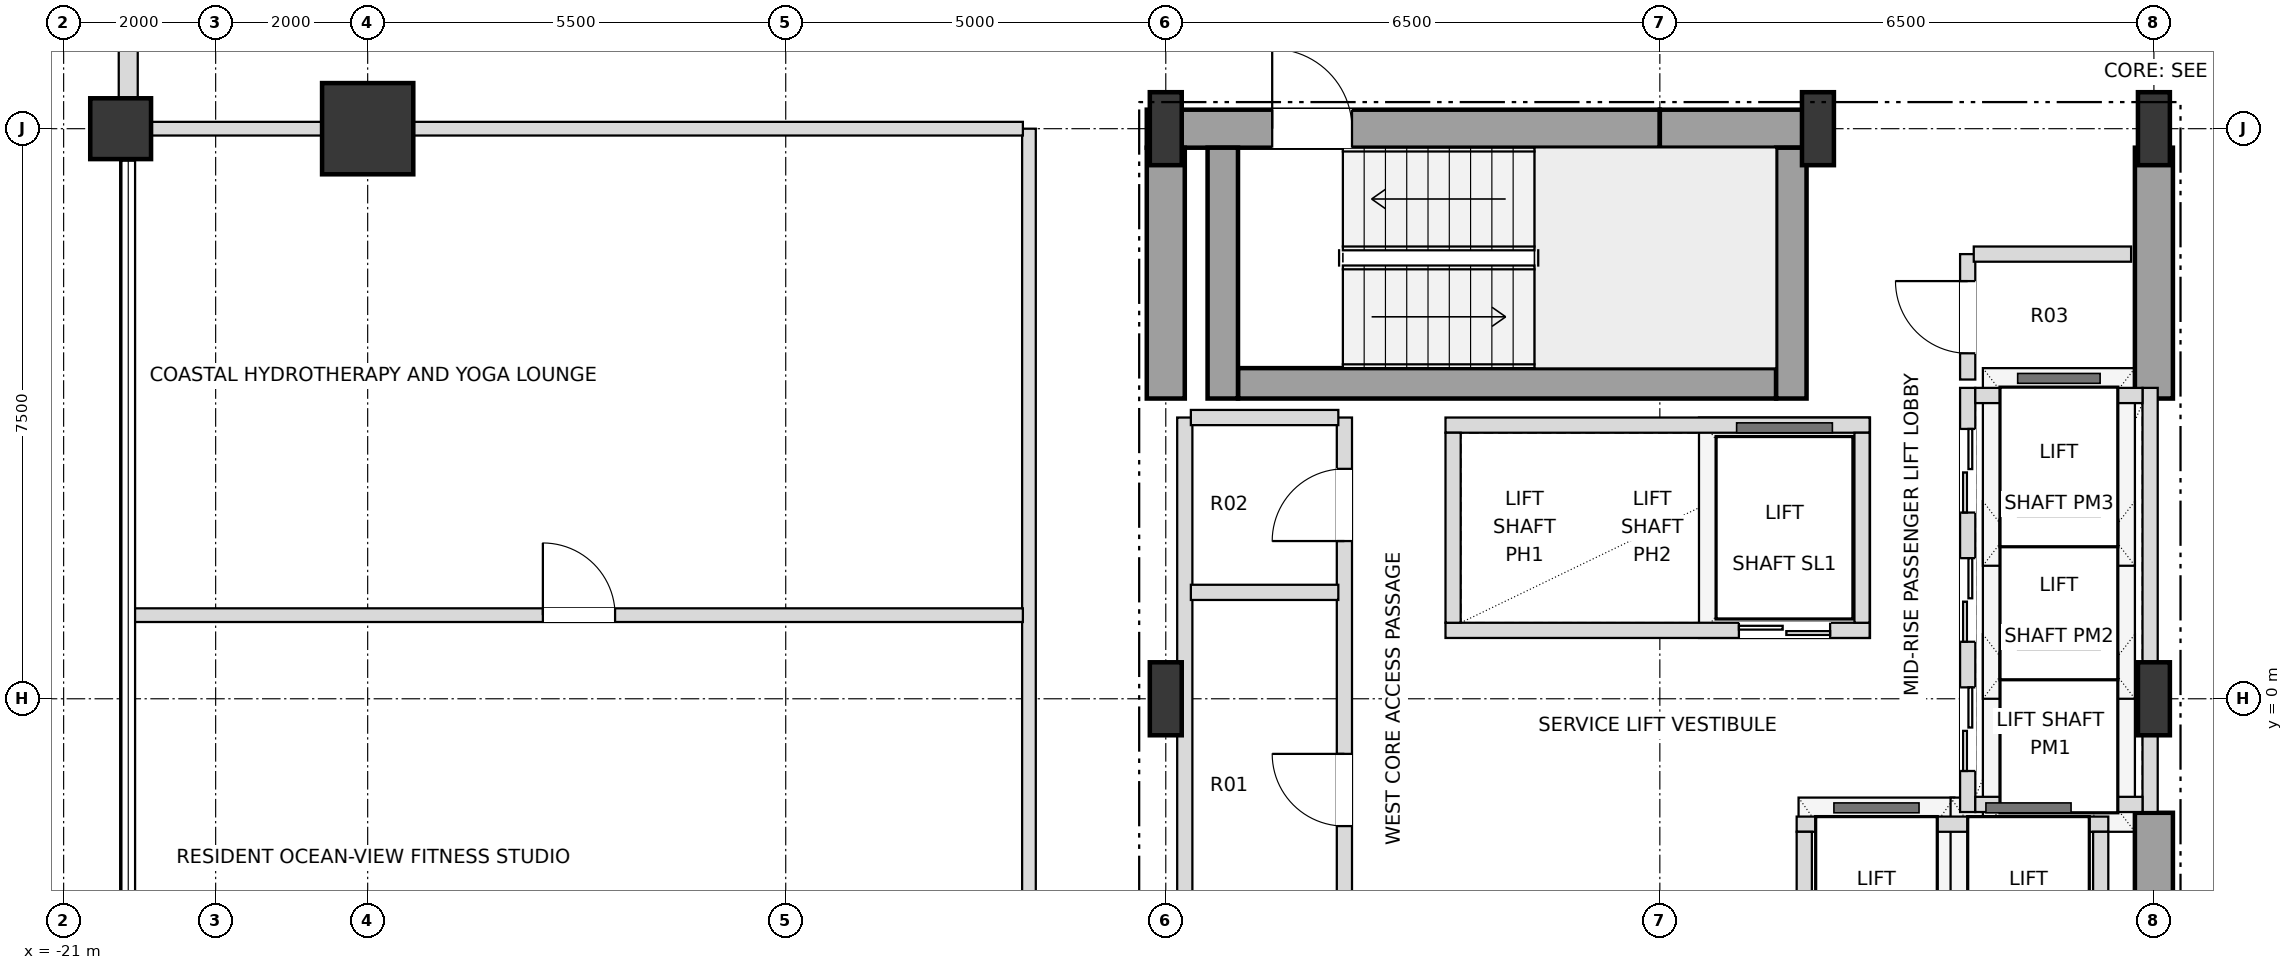
"""IFC4 building model, lengths in metres.
Left out: names, types, materials, properties, quantities, classifications, styles, units other than length and angle.
Written with IfcOpenShell. Run it as: python <this file> out.ifc"""

import sys

from ifc_helpers import new_model, si_unit, direction, frame, frame_2d, origin, origin_2d, place, context, subcontext, project, spatial, rectangle, i_section, extrude, element, fill, save


model = new_model("IFC4")
c1 = context("Model", 3, precision=1e-05, world=origin(), true_north=direction((0.0, 1.0)))
c2 = subcontext(c1, "Body", "Model", "MODEL_VIEW")
j1 = project(units=[si_unit("LENGTHUNIT", "METRE"), si_unit("PLANEANGLEUNIT", "RADIAN")], contexts=[c1])
p1 = place(None, origin())
s1 = spatial("IfcSite", under=j1, at=p1, CompositionType="ELEMENT")
p2 = place(p1, origin())
s2 = spatial("IfcBuilding", under=s1, at=p2, CompositionType="ELEMENT")
p3 = place(p2, frame((0.0, 0.0, 158.4)))
s3 = spatial("IfcBuildingStorey", under=s2, at=p3, CompositionType="ELEMENT", Elevation=158.4)
for number, where, z_axis, x_axis in (
    (1, (-6.5, 0.0, 0.0), (0.0, 0.0, 1.0), (1.0, 0.0, 0.0)),
    (2, (6.5, 0.0, 0.0), (0.0, 0.0, 1.0), (1.0, 0.0, 0.0)),
    (3, (-6.5, 7.5, 0.0), (0.0, 0.0, 1.0), (1.0, 0.0, 0.0)),
    (4, (2.08, 7.5, 0.0), (0.0, 0.0, 1.0), (1.0, 0.0, 0.0)),
    (5, (6.5, 7.5, 0.0), (0.0, 0.0, 1.0), (1.0, 0.0, 0.0)),
):
    element("IfcColumn", number, at=place(p3, frame(where, z_axis=z_axis, x_axis=x_axis)), inside=s3, PredefinedType="COLUMN", context=c2, shape_type="SweptSolid", body=[
        extrude(i_section(OverallWidth=0.42, OverallDepth=0.96, WebThickness=0.022, FlangeThickness=0.034, at=origin_2d()), origin(), (0.0, 0.0, 1.0), 3.6),
    ])
p4 = place(p3, frame((-17.0, 7.5, 0.0), z_axis=(0.0, 0.0, 1.0), x_axis=(1.0, 0.0, 0.0)))
e6 = element("IfcColumn", 6, at=p4, inside=s3, PredefinedType="USERDEFINED", context=c2, shape_type="SweptSolid", body=[
    extrude(rectangle(XDim=1.2, YDim=1.2, at=origin_2d()), origin(), (0.0, 0.0, 1.0), 3.6),
])
p5 = place(p3, frame((-20.25, 7.5, 0.0), z_axis=(0.0, 0.0, 1.0), x_axis=(1.0, 0.0, 0.0)))
e7 = element("IfcColumn", 7, at=p5, inside=s3, PredefinedType="COLUMN", context=c2, shape_type="SweptSolid", body=[
    extrude(rectangle(XDim=0.8, YDim=0.8, at=origin_2d()), origin(), (0.0, 0.0, 1.0), 3.6),
])
p6 = place(p3, frame((-20.15, 12.605, 0.0), z_axis=(0.0, 0.0, 1.0), x_axis=(0.0, -1.0, 0.0)))
e8 = element("IfcWall", 8, at=p6, inside=s3, PredefinedType="SOLIDWALL", context=c2, shape_type="SweptSolid", body=[
    extrude(rectangle(XDim=4.71, YDim=0.25, at=frame_2d((2.355, 0.0))), origin(), (0.0, 0.0, 1.0), 2.736),
])
p7 = place(p6, frame((1.455, 0.0, 0.72)))
e9 = element("IfcOpeningElement", 9, at=p7, cuts=e8, PredefinedType="OPENING", context=c2, shape_type="SweptSolid", body=[
    extrude(rectangle(XDim=1.8, YDim=1.68, at=frame_2d((0.9, 0.84))), frame((0.0, 0.135, 0.0), z_axis=(0.0, -1.0, 0.0), x_axis=(1.0, 0.0, 0.0)), (0.0, 0.0, 1.0), 0.27),
])
p8 = place(p3, frame((-6.75, 7.5, 0.0), z_axis=(0.0, 0.0, 1.0), x_axis=(1.0, 0.0, 0.0)))
e10 = element("IfcWall", 10, at=p8, inside=s3, PredefinedType="SHEAR", context=c2, shape_type="SweptSolid", body=[
    extrude(rectangle(XDim=6.75, YDim=0.5, at=frame_2d((3.375, 0.0))), origin(), (0.0, 0.0, 1.0), 3.38),
])
p9 = place(p8, frame((1.65, 0.0, 0.0)))
e11 = element("IfcOpeningElement", 11, at=p9, cuts=e10, PredefinedType="OPENING", context=c2, shape_type="SweptSolid", body=[
    extrude(rectangle(XDim=1.05, YDim=2.15, at=frame_2d((0.525, 1.075))), frame((0.0, 0.26, 0.0), z_axis=(0.0, -1.0, 0.0), x_axis=(1.0, 0.0, 0.0)), (0.0, 0.0, 1.0), 0.52),
])
p10 = place(p3, frame((0.0, 7.5, 0.0), z_axis=(0.0, 0.0, 1.0), x_axis=(1.0, 0.0, 0.0)))
e12 = element("IfcWall", 12, at=p10, inside=s3, PredefinedType="SHEAR", context=c2, shape_type="SweptSolid", body=[
    extrude(rectangle(XDim=2.08, YDim=0.5, at=frame_2d((1.04, 0.0))), origin(), (0.0, 0.0, 1.0), 3.38),
])
p11 = place(p3, frame((-6.5, 3.95, 0.0), z_axis=(0.0, 0.0, 1.0), x_axis=(0.0, 1.0, 0.0)))
e13 = element("IfcWall", 13, at=p11, inside=s3, PredefinedType="SHEAR", context=c2, shape_type="SweptSolid", body=[
    extrude(rectangle(XDim=3.3, YDim=0.5, at=frame_2d((1.65, 0.0))), origin(), (0.0, 0.0, 1.0), 3.38),
])
p12 = place(p3, frame((6.5, -7.25, 0.0), z_axis=(0.0, 0.0, 1.0), x_axis=(0.0, 1.0, 0.0)))
e14 = element("IfcWall", 14, at=p12, inside=s3, PredefinedType="SHEAR", context=c2, shape_type="SweptSolid", body=[
    extrude(rectangle(XDim=5.75, YDim=0.5, at=frame_2d((2.875, 0.0))), origin(), (0.0, 0.0, 1.0), 3.38),
])
p13 = place(p12, frame((0.85, 0.0, 0.0)))
e15 = element("IfcOpeningElement", 15, at=p13, cuts=e14, PredefinedType="OPENING", context=c2, shape_type="SweptSolid", body=[
    extrude(rectangle(XDim=1.05, YDim=2.15, at=frame_2d((0.525, 1.075))), frame((0.0, 0.26, 0.0), z_axis=(0.0, -1.0, 0.0), x_axis=(1.0, 0.0, 0.0)), (0.0, 0.0, 1.0), 0.52),
])
p14 = place(p3, frame((6.5, 3.95, 0.0), z_axis=(0.0, 0.0, 1.0), x_axis=(0.0, 1.0, 0.0)))
e16 = element("IfcWall", 16, at=p14, inside=s3, PredefinedType="SHEAR", context=c2, shape_type="SweptSolid", body=[
    extrude(rectangle(XDim=3.3, YDim=0.5, at=frame_2d((1.65, 0.0))), origin(), (0.0, 0.0, 1.0), 3.38),
])
p15 = place(p3, frame((-5.55, 4.15, 0.0), z_axis=(0.0, 0.0, 1.0), x_axis=(1.0, 0.0, 0.0)))
e17 = element("IfcWall", 17, at=p15, inside=s3, PredefinedType="SHEAR", context=c2, shape_type="SweptSolid", body=[
    extrude(rectangle(XDim=7.08, YDim=0.4, at=frame_2d((3.54, 0.0))), origin(), (0.0, 0.0, 1.0), 3.38),
])
for number, where, z_axis, x_axis in (
    (18, (1.73, 3.95, 0.0), (0.0, 0.0, 1.0), (0.0, 1.0, 0.0)),
    (19, (-5.75, 3.95, 0.0), (0.0, 0.0, 1.0), (0.0, 1.0, 0.0)),
):
    element("IfcWall", number, at=place(p3, frame(where, z_axis=z_axis, x_axis=x_axis)), inside=s3, PredefinedType="SHEAR", context=c2, shape_type="SweptSolid", body=[
        extrude(rectangle(XDim=3.3, YDim=0.4, at=frame_2d((1.65, 0.0))), origin(), (0.0, 0.0, 1.0), 3.38),
    ])
p16 = place(p3, frame((4.05, -1.49, 0.0), z_axis=(0.0, 0.0, 1.0), x_axis=(0.0, 1.0, 0.0)))
e20 = element("IfcWall", 20, at=p16, inside=s3, PredefinedType="SOLIDWALL", context=c2, shape_type="SweptSolid", body=[
    extrude(rectangle(XDim=5.58, YDim=0.2, at=frame_2d((2.79, 0.0))), origin(), (0.0, 0.0, 1.0), 3.38),
])
p17 = place(p16, frame((0.54, 0.0, 0.0)))
e21 = element("IfcOpeningElement", 21, at=p17, cuts=e20, PredefinedType="OPENING", context=c2, shape_type="SweptSolid", body=[
    extrude(rectangle(XDim=1.1, YDim=2.15, at=frame_2d((0.55, 1.075))), frame((0.0, 0.11, 0.0), z_axis=(0.0, -1.0, 0.0), x_axis=(1.0, 0.0, 0.0)), (0.0, 0.0, 1.0), 0.22),
])
p18 = place(p16, frame((2.24, 0.0, 0.0)))
e22 = element("IfcOpeningElement", 22, at=p18, cuts=e20, PredefinedType="OPENING", context=c2, shape_type="SweptSolid", body=[
    extrude(rectangle(XDim=1.1, YDim=2.15, at=frame_2d((0.55, 1.075))), frame((0.0, 0.11, 0.0), z_axis=(0.0, -1.0, 0.0), x_axis=(1.0, 0.0, 0.0)), (0.0, 0.0, 1.0), 0.22),
])
p19 = place(p16, frame((3.94, 0.0, 0.0)))
e23 = element("IfcOpeningElement", 23, at=p19, cuts=e20, PredefinedType="OPENING", context=c2, shape_type="SweptSolid", body=[
    extrude(rectangle(XDim=1.1, YDim=2.15, at=frame_2d((0.55, 1.075))), frame((0.0, 0.11, 0.0), z_axis=(0.0, -1.0, 0.0), x_axis=(1.0, 0.0, 0.0)), (0.0, 0.0, 1.0), 0.22),
])
p20 = place(p3, frame((6.45, -1.49, 0.0), z_axis=(0.0, 0.0, 1.0), x_axis=(0.0, 1.0, 0.0)))
e24 = element("IfcWall", 24, at=p20, inside=s3, PredefinedType="SOLIDWALL", context=c2, shape_type="SweptSolid", body=[
    extrude(rectangle(XDim=5.58, YDim=0.2, at=frame_2d((2.79, 0.0))), origin(), (0.0, 0.0, 1.0), 2.816),
])
for number, where, z_axis, x_axis in (
    (25, (4.15, -1.39, 0.0), (0.0, 0.0, 1.0), (1.0, 0.0, 0.0)),
    (26, (4.15, 3.99, 0.0), (0.0, 0.0, 1.0), (1.0, 0.0, 0.0)),
):
    element("IfcWall", number, at=place(p3, frame(where, z_axis=z_axis, x_axis=x_axis)), inside=s3, PredefinedType="SOLIDWALL", context=c2, shape_type="SweptSolid", body=[
        extrude(rectangle(XDim=2.2, YDim=0.2, at=frame_2d((1.1, 0.0))), origin(), (0.0, 0.0, 1.0), 3.38),
    ])
p21 = place(p3, frame((-2.82, 0.9, 0.0), z_axis=(0.0, 0.0, 1.0), x_axis=(1.0, 0.0, 0.0)))
e27 = element("IfcWall", 27, at=p21, inside=s3, PredefinedType="SOLIDWALL", context=c2, shape_type="SweptSolid", body=[
    extrude(rectangle(XDim=5.58, YDim=0.2, at=frame_2d((2.79, 0.0))), origin(), (0.0, 0.0, 1.0), 3.38),
])
p22 = place(p21, frame((3.86, 0.0, 0.0)))
e28 = element("IfcOpeningElement", 28, at=p22, cuts=e27, PredefinedType="OPENING", context=c2, shape_type="SweptSolid", body=[
    extrude(rectangle(XDim=1.2, YDim=2.2, at=frame_2d((0.6, 1.1))), frame((0.0, 0.11, 0.0), z_axis=(0.0, -1.0, 0.0), x_axis=(1.0, 0.0, 0.0)), (0.0, 0.0, 1.0), 0.22),
])
p23 = place(p3, frame((-2.82, 3.6, 0.0), z_axis=(0.0, 0.0, 1.0), x_axis=(1.0, 0.0, 0.0)))
e29 = element("IfcWall", 29, at=p23, inside=s3, PredefinedType="SOLIDWALL", context=c2, shape_type="SweptSolid", body=[
    extrude(rectangle(XDim=5.58, YDim=0.2, at=frame_2d((2.79, 0.0))), origin(), (0.0, 0.0, 1.0), 3.38),
])
for number, where, z_axis, x_axis in (
    (30, (-2.72, 1.0, 0.0), (0.0, 0.0, 1.0), (0.0, 1.0, 0.0)),
    (31, (2.66, 1.0, 0.0), (0.0, 0.0, 1.0), (0.0, 1.0, 0.0)),
):
    element("IfcWall", number, at=place(p3, frame(where, z_axis=z_axis, x_axis=x_axis)), inside=s3, PredefinedType="SOLIDWALL", context=c2, shape_type="SweptSolid", body=[
        extrude(rectangle(XDim=2.5, YDim=0.2, at=frame_2d((1.25, 0.0))), origin(), (0.0, 0.0, 1.0), 3.38),
    ])
p24 = place(p3, frame((1.8, -1.65, 0.0), z_axis=(0.0, 0.0, 1.0), x_axis=(1.0, 0.0, 0.0)))
e32 = element("IfcWall", 32, at=p24, inside=s3, PredefinedType="SOLIDWALL", context=c2, shape_type="SweptSolid", body=[
    extrude(rectangle(XDim=4.1, YDim=0.2, at=frame_2d((2.05, 0.0))), origin(), (0.0, 0.0, 1.0), 3.38),
])
for number, where, z_axis, x_axis in (
    (33, (1.9, -3.75, 0.0), (0.0, 0.0, 1.0), (0.0, 1.0, 0.0)),
    (34, (5.8, -3.75, 0.0), (0.0, 0.0, 1.0), (0.0, 1.0, 0.0)),
):
    element("IfcWall", number, at=place(p3, frame(where, z_axis=z_axis, x_axis=x_axis)), inside=s3, PredefinedType="SOLIDWALL", context=c2, shape_type="SweptSolid", body=[
        extrude(rectangle(XDim=2.0, YDim=0.2, at=frame_2d((1.0, 0.0))), origin(), (0.0, 0.0, 1.0), 3.38),
    ])
p25 = place(p3, frame((-8.3, -7.5, 0.0), z_axis=(0.0, 0.0, 1.0), x_axis=(0.0, 1.0, 0.0)))
e35 = element("IfcWall", 35, at=p25, inside=s3, PredefinedType="PARTITIONING", context=c2, shape_type="SweptSolid", body=[
    extrude(rectangle(XDim=15.0, YDim=0.18, at=frame_2d((7.5, 0.0))), origin(), (0.0, 0.0, 1.0), 3.38),
])
p26 = place(p25, frame((0.605, 0.0, 0.0)))
e36 = element("IfcOpeningElement", 36, at=p26, cuts=e35, PredefinedType="OPENING", context=c2, shape_type="SweptSolid", body=[
    extrude(rectangle(XDim=0.95, YDim=2.15, at=frame_2d((0.475, 1.075))), frame((0.0, 0.1, 0.0), z_axis=(0.0, -1.0, 0.0), x_axis=(1.0, 0.0, 0.0)), (0.0, 0.0, 1.0), 0.2),
])
p27 = place(p25, frame((2.605, 0.0, 0.0)))
e37 = element("IfcOpeningElement", 37, at=p27, cuts=e35, PredefinedType="OPENING", context=c2, shape_type="SweptSolid", body=[
    extrude(rectangle(XDim=0.95, YDim=2.15, at=frame_2d((0.475, 1.075))), frame((0.0, 0.1, 0.0), z_axis=(0.0, -1.0, 0.0), x_axis=(1.0, 0.0, 0.0)), (0.0, 0.0, 1.0), 0.2),
])
p28 = place(p3, frame((-6.25, -3.64, 0.0), z_axis=(0.0, 0.0, 1.0), x_axis=(0.0, 1.0, 0.0)))
e38 = element("IfcWall", 38, at=p28, inside=s3, PredefinedType="SOLIDWALL", context=c2, shape_type="SweptSolid", body=[
    extrude(rectangle(XDim=7.34, YDim=0.2, at=frame_2d((3.67, 0.0))), origin(), (0.0, 0.0, 1.0), 3.38),
])
p29 = place(p3, frame((-4.15, -3.7, 0.0), z_axis=(0.0, 0.0, 1.0), x_axis=(0.0, 1.0, 0.0)))
e39 = element("IfcWall", 39, at=p29, inside=s3, PredefinedType="SOLIDWALL", context=c2, shape_type="SweptSolid", body=[
    extrude(rectangle(XDim=7.4, YDim=0.2, at=frame_2d((3.7, 0.0))), origin(), (0.0, 0.0, 1.0), 3.38),
])
p30 = place(p29, frame((2.025, 0.0, 0.0)))
e40 = element("IfcOpeningElement", 40, at=p30, cuts=e39, PredefinedType="OPENING", context=c2, shape_type="SweptSolid", body=[
    extrude(rectangle(XDim=0.95, YDim=2.15, at=frame_2d((0.475, 1.075))), frame((0.0, 0.11, 0.0), z_axis=(0.0, -1.0, 0.0), x_axis=(1.0, 0.0, 0.0)), (0.0, 0.0, 1.0), 0.22),
])
p31 = place(p29, frame((5.775, 0.0, 0.0)))
e41 = element("IfcOpeningElement", 41, at=p31, cuts=e39, PredefinedType="OPENING", context=c2, shape_type="SweptSolid", body=[
    extrude(rectangle(XDim=0.95, YDim=2.15, at=frame_2d((0.475, 1.075))), frame((0.0, 0.11, 0.0), z_axis=(0.0, -1.0, 0.0), x_axis=(1.0, 0.0, 0.0)), (0.0, 0.0, 1.0), 0.22),
])
p32 = place(p3, frame((4.05, 4.2, 0.0), z_axis=(0.0, 0.0, 1.0), x_axis=(0.0, 1.0, 0.0)))
e42 = element("IfcWall", 42, at=p32, inside=s3, PredefinedType="SOLIDWALL", context=c2, shape_type="SweptSolid", body=[
    extrude(rectangle(XDim=1.65, YDim=0.2, at=frame_2d((0.825, 0.0))), origin(), (0.0, 0.0, 1.0), 3.38),
])
p33 = place(p32, frame((0.345, 0.0, 0.0)))
e43 = element("IfcOpeningElement", 43, at=p33, cuts=e42, PredefinedType="OPENING", context=c2, shape_type="SweptSolid", body=[
    extrude(rectangle(XDim=0.95, YDim=2.15, at=frame_2d((0.475, 1.075))), frame((0.0, 0.11, 0.0), z_axis=(0.0, -1.0, 0.0), x_axis=(1.0, 0.0, 0.0)), (0.0, 0.0, 1.0), 0.22),
])
p34 = place(p3, frame((-20.07, 1.1, 0.0), z_axis=(0.0, 0.0, 1.0), x_axis=(1.0, 0.0, 0.0)))
e44 = element("IfcWall", 44, at=p34, inside=s3, PredefinedType="PARTITIONING", context=c2, shape_type="SweptSolid", body=[
    extrude(rectangle(XDim=11.69, YDim=0.18, at=frame_2d((5.845, 0.0))), origin(), (0.0, 0.0, 1.0), 2.816),
])
p35 = place(p34, frame((5.375, 0.0, 0.0)))
e45 = element("IfcOpeningElement", 45, at=p35, cuts=e44, PredefinedType="OPENING", context=c2, shape_type="SweptSolid", body=[
    extrude(rectangle(XDim=0.95, YDim=2.15, at=frame_2d((0.475, 1.075))), frame((0.0, 0.1, 0.0), z_axis=(0.0, -1.0, 0.0), x_axis=(1.0, 0.0, 0.0)), (0.0, 0.0, 1.0), 0.2),
])
for number, where, z_axis, x_axis in (
    (46, (-6.17, 1.4, 0.0), (0.0, 0.0, 1.0), (1.0, 0.0, 0.0)),
    (47, (-6.17, 3.7, 0.0), (0.0, 0.0, 1.0), (1.0, 0.0, 0.0)),
):
    element("IfcWall", number, at=place(p3, frame(where, z_axis=z_axis, x_axis=x_axis)), inside=s3, PredefinedType="SOLIDWALL", context=c2, shape_type="SweptSolid", body=[
        extrude(rectangle(XDim=1.94, YDim=0.2, at=frame_2d((0.97, 0.0))), origin(), (0.0, 0.0, 1.0), 3.38),
    ])
p36 = place(p3, frame((4.13, 5.85, 0.0), z_axis=(0.0, 0.0, 1.0), x_axis=(1.0, 0.0, 0.0)))
e48 = element("IfcWall", 48, at=p36, inside=s3, PredefinedType="SOLIDWALL", context=c2, shape_type="SweptSolid", body=[
    extrude(rectangle(XDim=2.07, YDim=0.2, at=frame_2d((1.035, 0.0))), origin(), (0.0, 0.0, 1.0), 3.38),
])
p37 = place(p3, frame((-20.15, 7.5, 0.0), z_axis=(0.0, 0.0, 1.0), x_axis=(1.0, 0.0, 0.0)))
e49 = element("IfcWall", 49, at=p37, inside=s3, PredefinedType="PARTITIONING", context=c2, shape_type="SweptSolid", body=[
    extrude(rectangle(XDim=11.77, YDim=0.18, at=frame_2d((5.885, 0.0))), origin(), (0.0, 0.0, 1.0), 2.816),
])
p38 = place(p9, origin())
e50 = element("IfcDoor", 50, at=p38, inside=s3, OperationType="SINGLE_SWING_LEFT", PredefinedType="DOOR", context=c2, shape_type="SweptSolid", body=[
    extrude(rectangle(XDim=1.05, YDim=2.15, at=frame_2d((0.525, 1.075))), frame((0.0, 0.025, 0.0), z_axis=(0.0, -1.0, 0.0), x_axis=(1.0, 0.0, 0.0)), (0.0, 0.0, 1.0), 0.05),
])
fill(e11, e50)
p39 = place(p17, origin())
e51 = element("IfcDoor", 51, at=p39, inside=s3, OperationType="DOUBLE_DOOR_SLIDING", PredefinedType="DOOR", context=c2, shape_type="SweptSolid", body=[
    extrude(rectangle(XDim=1.1, YDim=2.15, at=frame_2d((0.55, 1.075))), frame((0.0, 0.025, 0.0), z_axis=(0.0, -1.0, 0.0), x_axis=(1.0, 0.0, 0.0)), (0.0, 0.0, 1.0), 0.05),
])
fill(e21, e51)
p40 = place(p18, origin())
e52 = element("IfcDoor", 52, at=p40, inside=s3, OperationType="DOUBLE_DOOR_SLIDING", PredefinedType="DOOR", context=c2, shape_type="SweptSolid", body=[
    extrude(rectangle(XDim=1.1, YDim=2.15, at=frame_2d((0.55, 1.075))), frame((0.0, 0.025, 0.0), z_axis=(0.0, -1.0, 0.0), x_axis=(1.0, 0.0, 0.0)), (0.0, 0.0, 1.0), 0.05),
])
fill(e22, e52)
p41 = place(p19, origin())
e53 = element("IfcDoor", 53, at=p41, inside=s3, OperationType="DOUBLE_DOOR_SLIDING", PredefinedType="DOOR", context=c2, shape_type="SweptSolid", body=[
    extrude(rectangle(XDim=1.1, YDim=2.15, at=frame_2d((0.55, 1.075))), frame((0.0, 0.025, 0.0), z_axis=(0.0, -1.0, 0.0), x_axis=(1.0, 0.0, 0.0)), (0.0, 0.0, 1.0), 0.05),
])
fill(e23, e53)
p42 = place(p22, origin())
e54 = element("IfcDoor", 54, at=p42, inside=s3, OperationType="DOUBLE_DOOR_SLIDING", PredefinedType="DOOR", context=c2, shape_type="SweptSolid", body=[
    extrude(rectangle(XDim=1.2, YDim=2.2, at=frame_2d((0.6, 1.1))), frame((0.0, 0.025, 0.0), z_axis=(0.0, -1.0, 0.0), x_axis=(1.0, 0.0, 0.0)), (0.0, 0.0, 1.0), 0.05),
])
fill(e28, e54)
p43 = place(p30, origin())
e55 = element("IfcDoor", 55, at=p43, inside=s3, OperationType="SINGLE_SWING_RIGHT", PredefinedType="DOOR", context=c2, shape_type="SweptSolid", body=[
    extrude(rectangle(XDim=0.95, YDim=2.15, at=frame_2d((0.475, 1.075))), frame((0.0, 0.025, 0.0), z_axis=(0.0, -1.0, 0.0), x_axis=(1.0, 0.0, 0.0)), (0.0, 0.0, 1.0), 0.05),
])
fill(e40, e55)
p44 = place(p31, origin())
e56 = element("IfcDoor", 56, at=p44, inside=s3, OperationType="SINGLE_SWING_LEFT", PredefinedType="DOOR", context=c2, shape_type="SweptSolid", body=[
    extrude(rectangle(XDim=0.95, YDim=2.15, at=frame_2d((0.475, 1.075))), frame((0.0, 0.025, 0.0), z_axis=(0.0, -1.0, 0.0), x_axis=(1.0, 0.0, 0.0)), (0.0, 0.0, 1.0), 0.05),
])
fill(e41, e56)
p45 = place(p33, origin())
e57 = element("IfcDoor", 57, at=p45, inside=s3, OperationType="SINGLE_SWING_RIGHT", PredefinedType="DOOR", context=c2, shape_type="SweptSolid", body=[
    extrude(rectangle(XDim=0.95, YDim=2.15, at=frame_2d((0.475, 1.075))), frame((0.0, 0.025, 0.0), z_axis=(0.0, -1.0, 0.0), x_axis=(1.0, 0.0, 0.0)), (0.0, 0.0, 1.0), 0.05),
])
fill(e43, e57)
p46 = place(p35, origin())
e58 = element("IfcDoor", 58, at=p46, inside=s3, OperationType="SINGLE_SWING_LEFT", PredefinedType="DOOR", context=c2, shape_type="SweptSolid", body=[
    extrude(rectangle(XDim=0.95, YDim=2.15, at=frame_2d((0.475, 1.075))), frame((0.0, 0.025, 0.0), z_axis=(0.0, -1.0, 0.0), x_axis=(1.0, 0.0, 0.0)), (0.0, 0.0, 1.0), 0.05),
])
fill(e45, e58)
save(model, sys.argv[1])
